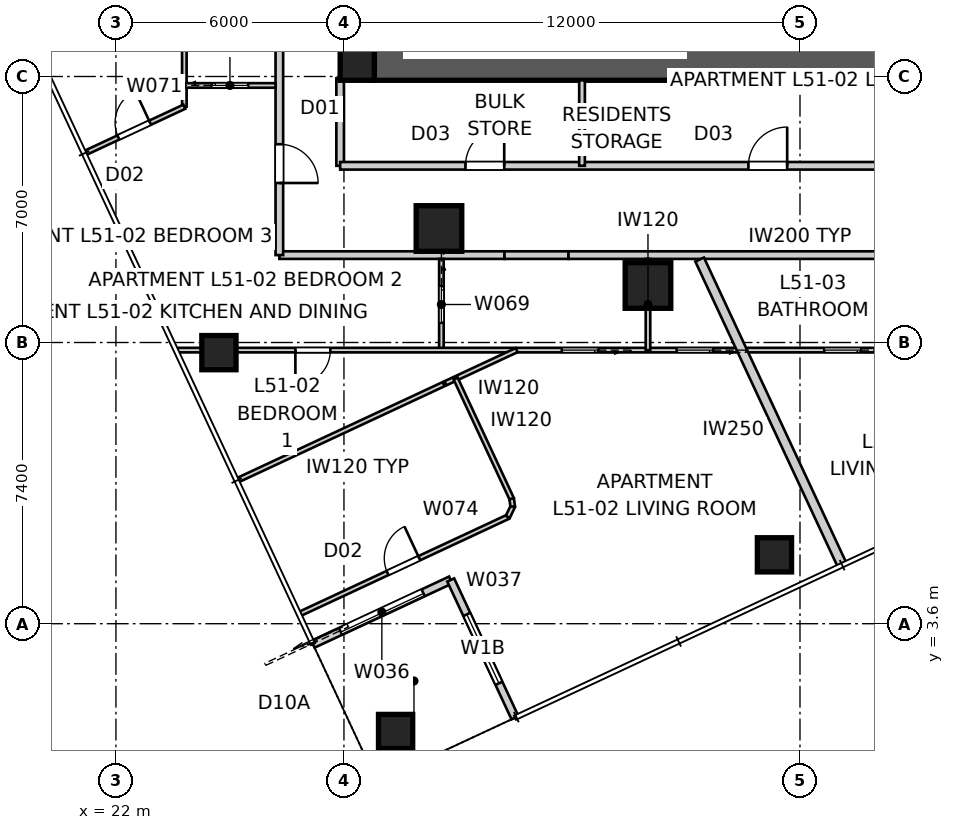
"""IFC4 building model, lengths in metres.
Left out: names, types, materials, properties, quantities, classifications, styles, units other than length and angle.
Written with IfcOpenShell. Run it as: python <this file> out.ifc"""

import sys

from ifc_helpers import new_model, si_unit, direction, frame, frame_2d, origin, origin_2d, place, context, subcontext, project, spatial, polyline, rectangle, outline, extrude, element, fill, save


model = new_model("IFC4")
c1 = context("Model", 3, precision=1e-05, world=origin(), true_north=direction((0.0, 1.0)))
c2 = subcontext(c1, "Body", "Model", "MODEL_VIEW")
j1 = project(units=[si_unit("LENGTHUNIT", "METRE"), si_unit("PLANEANGLEUNIT", "RADIAN")], contexts=[c1])
p1 = place(None, origin())
s1 = spatial("IfcSite", under=j1, at=p1, CompositionType="ELEMENT")
p2 = place(p1, origin())
s2 = spatial("IfcBuilding", under=s1, at=p2, CompositionType="ELEMENT")
p3 = place(p2, frame((0.0, 0.0, 186.2)))
s3 = spatial("IfcBuildingStorey", under=s2, at=p3, CompositionType="ELEMENT", Elevation=186.2)
p4 = place(p3, frame((51.2, 18.35, 0.0), z_axis=(0.0, 0.0, 1.0), x_axis=(-1.0, 0.0, 0.0)))
e1 = element("IfcWall", 1, at=p4, inside=s3, PredefinedType="SHEAR", context=c2, shape_type="SweptSolid", body=[
    extrude(outline(polyline([(0.0, -0.45), (22.4, -0.45), (22.4, -0.025), (22.85, -0.025), (22.85, 0.025), (22.4, 0.025), (22.4, 0.45), (0.0, 0.45), (0.0, 0.025), (-0.45, 0.025), (-0.45, -0.025), (0.0, -0.025), (0.0, -0.45)])), origin(), (0.0, 0.0, 1.0), 3.4),
])
p5 = place(p3, frame((28.35, 41.2, 0.0), z_axis=(0.0, 0.0, 1.0), x_axis=(0.0, -1.0, 0.0)))
e2 = element("IfcWall", 2, at=p5, inside=s3, PredefinedType="SHEAR", context=c2, shape_type="SweptSolid", body=[
    extrude(outline(polyline([(0.0, -0.45), (22.4, -0.45), (22.4, -0.025), (22.85, -0.025), (22.85, 0.025), (22.4, 0.025), (22.4, 0.45), (0.0, 0.45), (0.0, 0.025), (-0.45, 0.025), (-0.45, -0.025), (0.0, -0.025), (0.0, -0.45)])), origin(), (0.0, 0.0, 1.0), 3.4),
])
p6 = place(p5, frame((11.14, 0.0, 0.0)))
e3 = element("IfcOpeningElement", 3, at=p6, cuts=e2, PredefinedType="OPENING", context=c2, shape_type="SweptSolid", body=[
    extrude(rectangle(XDim=1.02, YDim=2.4, at=frame_2d((0.51, 1.2))), frame((0.0, 0.46, 0.0), z_axis=(0.0, -1.0, 0.0), x_axis=(1.0, 0.0, 0.0)), (0.0, 0.0, 1.0), 0.92),
])
for number, where, z_axis, x_axis in (
    (4, (28.35, 18.35, 0.0), (0.0, 0.0, 1.0), (1.0, 0.0, 0.0)),
    (5, (29.359, 0.764, 0.0), (0.0, 0.0, 1.0), (1.0, 0.0, 0.0)),
    (6, (39.328, 5.412, 0.0), (0.0, 0.0, 1.0), (1.0, 0.0, 0.0)),
    (7, (24.71, 10.733, 0.0), (0.0, 0.0, 1.0), (1.0, 0.0, 0.0)),
):
    element("IfcColumn", number, at=place(p3, frame(where, z_axis=z_axis, x_axis=x_axis)), inside=s3, PredefinedType="COLUMN", context=c2, shape_type="SweptSolid", body=[
        extrude(rectangle(XDim=0.9, YDim=0.9, at=origin_2d()), origin(), (0.0, 0.0, 1.0), 3.4),
    ])
for number, where, z_axis, x_axis in (
    (8, (30.5, 14.0, 0.0), (0.0, 0.0, 1.0), (1.0, 0.0, 0.0)),
    (9, (36.0, 12.5, 0.0), (0.0, 0.0, 1.0), (1.0, 0.0, 0.0)),
):
    element("IfcColumn", number, at=place(p3, frame(where, z_axis=z_axis, x_axis=x_axis)), inside=s3, PredefinedType="COLUMN", context=c2, shape_type="SweptSolid", body=[
        extrude(rectangle(XDim=1.2, YDim=1.2, at=origin_2d()), origin(), (0.0, 0.0, 1.0), 3.4),
    ])
p7 = place(p3, frame((27.185, 3.06, 0.0), z_axis=(0.0, 0.0, 1.0), x_axis=(0.906289140828, 0.422658246362, 0.0)))
e10 = element("IfcWall", 10, at=p7, inside=s3, PredefinedType="SOLIDWALL", context=c2, shape_type="SweptSolid", body=[
    extrude(rectangle(XDim=4.0, YDim=0.2, at=frame_2d((2.0, 0.0))), origin(), (0.0, 0.0, 1.0), 3.25),
])
p8 = place(p7, frame((0.8, 0.0, 0.0)))
e11 = element("IfcOpeningElement", 11, at=p8, cuts=e10, PredefinedType="OPENING", context=c2, shape_type="SweptSolid", body=[
    extrude(rectangle(XDim=2.4, YDim=2.1, at=frame_2d((1.2, 1.05))), frame((0.0, 0.11, 0.0), z_axis=(0.0, -1.0, 0.0), x_axis=(1.0, 0.0, 0.0)), (0.0, 0.0, 1.0), 0.22),
])
p9 = place(p3, frame((30.81, 4.75, 0.0), z_axis=(0.0, 0.0, 1.0), x_axis=(0.422658246362, -0.906289140828, 0.0)))
e12 = element("IfcWall", 12, at=p9, inside=s3, PredefinedType="SOLIDWALL", context=c2, shape_type="SweptSolid", body=[
    extrude(rectangle(XDim=4.0, YDim=0.2, at=frame_2d((2.0, 0.0))), origin(), (0.0, 0.0, 1.0), 3.25),
])
p10 = place(p9, frame((1.0, 0.0, 0.45)))
e13 = element("IfcOpeningElement", 13, at=p10, cuts=e12, PredefinedType="OPENING", context=c2, shape_type="SweptSolid", body=[
    extrude(rectangle(XDim=2.0, YDim=1.8, at=frame_2d((1.0, 0.9))), frame((0.0, 0.11, 0.0), z_axis=(0.0, -1.0, 0.0), x_axis=(1.0, 0.0, 0.0)), (0.0, 0.0, 1.0), 0.22),
])
p11 = place(p3, frame((26.3, 13.3, 0.0), z_axis=(0.0, 0.0, 1.0), x_axis=(1.0, 0.0, 0.0)))
e14 = element("IfcWall", 14, at=p11, inside=s3, PredefinedType="PARTITIONING", context=c2, shape_type="SweptSolid", body=[
    extrude(rectangle(XDim=5.925, YDim=0.2, at=frame_2d((2.962, 0.0))), origin(), (0.0, 0.0, 1.0), 3.25),
])
p12 = place(p3, frame((32.225, 13.3, 0.0), z_axis=(0.0, 0.0, 1.0), x_axis=(1.0, 0.0, 0.0)))
e15 = element("IfcWall", 15, at=p12, inside=s3, PredefinedType="PARTITIONING", context=c2, shape_type="SweptSolid", body=[
    extrude(rectangle(XDim=1.684, YDim=0.2, at=frame_2d((0.842, 0.0))), origin(), (0.0, 0.0, 1.0), 2.55),
])
p13 = place(p3, frame((33.908, 13.3, 0.0), z_axis=(0.0, 0.0, 1.0), x_axis=(1.0, 0.0, 0.0)))
e16 = element("IfcWall", 16, at=p13, inside=s3, PredefinedType="PARTITIONING", context=c2, shape_type="SweptSolid", body=[
    extrude(rectangle(XDim=12.183, YDim=0.2, at=frame_2d((6.092, 0.0))), origin(), (0.0, 0.0, 1.0), 3.25),
])
p14 = place(p3, frame((26.3, 47.1, 0.0), z_axis=(0.0, 0.0, 1.0), x_axis=(0.0, -1.0, 0.0)))
e17 = element("IfcWall", 17, at=p14, inside=s3, PredefinedType="PARTITIONING", context=c2, shape_type="SweptSolid", body=[
    extrude(rectangle(XDim=33.8, YDim=0.2, at=frame_2d((16.9, 0.0))), origin(), (0.0, 0.0, 1.0), 3.25),
])
p15 = place(p14, frame((15.449, 0.0, 0.0)))
e18 = element("IfcOpeningElement", 18, at=p15, cuts=e17, PredefinedType="OPENING", context=c2, shape_type="SweptSolid", body=[
    extrude(rectangle(XDim=1.02, YDim=2.34, at=frame_2d((0.51, 1.17))), frame((0.0, 0.11, 0.0), z_axis=(0.0, -1.0, 0.0), x_axis=(1.0, 0.0, 0.0)), (0.0, 0.0, 1.0), 0.22),
])
p16 = place(p14, frame((30.883, 0.0, 0.0)))
e19 = element("IfcOpeningElement", 19, at=p16, cuts=e17, PredefinedType="OPENING", context=c2, shape_type="SweptSolid", body=[
    extrude(rectangle(XDim=1.02, YDim=2.34, at=frame_2d((0.51, 1.17))), frame((0.0, 0.11, 0.0), z_axis=(0.0, -1.0, 0.0), x_axis=(1.0, 0.0, 0.0)), (0.0, 0.0, 1.0), 0.22),
])
p17 = place(p3, frame((41.11, 5.14, 0.0), z_axis=(0.0, 0.0, 1.0), x_axis=(-0.42262942879, 0.906302579672, 0.0)))
e20 = element("IfcWall", 20, at=p17, inside=s3, PredefinedType="PARTITIONING", context=c2, shape_type="SweptSolid", body=[
    extrude(rectangle(XDim=8.875, YDim=0.25, at=frame_2d((4.438, 0.0))), origin(), (0.0, 0.0, 1.0), 3.25),
])
p18 = place(p3, frame((27.9, 17.95, 0.0), z_axis=(0.0, 0.0, 1.0), x_axis=(0.0, -1.0, 0.0)))
e21 = element("IfcWall", 21, at=p18, inside=s3, PredefinedType="PARTITIONING", context=c2, shape_type="SweptSolid", body=[
    extrude(rectangle(XDim=2.3, YDim=0.2, at=frame_2d((1.15, 0.0))), origin(), (0.0, 0.0, 1.0), 3.25),
])
p19 = place(p3, frame((27.9, 15.65, 0.0), z_axis=(0.0, 0.0, 1.0), x_axis=(1.0, 0.0, 0.0)))
e22 = element("IfcWall", 22, at=p19, inside=s3, PredefinedType="PARTITIONING", context=c2, shape_type="SweptSolid", body=[
    extrude(rectangle(XDim=24.2, YDim=0.2, at=frame_2d((12.1, 0.0))), origin(), (0.0, 0.0, 1.0), 3.25),
])
p20 = place(p19, frame((10.743, 0.0, 0.0)))
e23 = element("IfcOpeningElement", 23, at=p20, cuts=e22, PredefinedType="OPENING", context=c2, shape_type="SweptSolid", body=[
    extrude(rectangle(XDim=1.02, YDim=2.1, at=frame_2d((0.51, 1.05))), frame((0.0, 0.11, 0.0), z_axis=(0.0, -1.0, 0.0), x_axis=(1.0, 0.0, 0.0)), (0.0, 0.0, 1.0), 0.22),
])
p21 = place(p19, frame((19.636, 0.0, 0.0)))
e24 = element("IfcOpeningElement", 24, at=p21, cuts=e22, PredefinedType="OPENING", context=c2, shape_type="SweptSolid", body=[
    extrude(rectangle(XDim=1.02, YDim=2.1, at=frame_2d((0.51, 1.05))), frame((0.0, 0.11, 0.0), z_axis=(0.0, -1.0, 0.0), x_axis=(1.0, 0.0, 0.0)), (0.0, 0.0, 1.0), 0.22),
])
p22 = place(p19, frame((3.297, 0.0, 0.0)))
e25 = element("IfcOpeningElement", 25, at=p22, cuts=e22, PredefinedType="OPENING", context=c2, shape_type="SweptSolid", body=[
    extrude(rectangle(XDim=1.02, YDim=2.1, at=frame_2d((0.51, 1.05))), frame((0.0, 0.11, 0.0), z_axis=(0.0, -1.0, 0.0), x_axis=(1.0, 0.0, 0.0)), (0.0, 0.0, 1.0), 0.22),
])
p23 = place(p3, frame((34.265, 15.65, 0.0), z_axis=(0.0, 0.0, 1.0), x_axis=(0.0, 1.0, 0.0)))
e26 = element("IfcWall", 26, at=p23, inside=s3, PredefinedType="SOLIDWALL", context=c2, shape_type="SweptSolid", body=[
    extrude(rectangle(XDim=2.25, YDim=0.15, at=frame_2d((1.125, 0.0))), origin(), (0.0, 0.0, 1.0), 2.796),
])
p24 = place(p3, frame((23.8, 17.205, 0.0), z_axis=(0.0, 0.0, 1.0), x_axis=(0.0, 1.0, 0.0)))
e27 = element("IfcWall", 27, at=p24, inside=s3, PredefinedType="PARTITIONING", context=c2, shape_type="SweptSolid", body=[
    extrude(rectangle(XDim=30.574, YDim=0.12, at=frame_2d((15.287, 0.0))), origin(), (0.0, 0.0, 1.0), 2.55),
])
p25 = place(p24, frame((12.857, 0.0, 0.0)))
e28 = element("IfcOpeningElement", 28, at=p25, cuts=e27, PredefinedType="OPENING", context=c2, shape_type="SweptSolid", body=[
    extrude(rectangle(XDim=0.92, YDim=2.34, at=frame_2d((0.46, 1.17))), frame((0.0, 0.07, 0.0), z_axis=(0.0, -1.0, 0.0), x_axis=(1.0, 0.0, 0.0)), (0.0, 0.0, 1.0), 0.14),
])
p26 = place(p24, frame((28.042, 0.0, 0.0)))
e29 = element("IfcOpeningElement", 29, at=p26, cuts=e27, PredefinedType="OPENING", context=c2, shape_type="SweptSolid", body=[
    extrude(rectangle(XDim=0.92, YDim=2.34, at=frame_2d((0.46, 1.17))), frame((0.0, 0.07, 0.0), z_axis=(0.0, -1.0, 0.0), x_axis=(1.0, 0.0, 0.0)), (0.0, 0.0, 1.0), 0.14),
])
p27 = place(p24, frame((20.655, 0.0, 0.0)))
e30 = element("IfcOpeningElement", 30, at=p27, cuts=e27, PredefinedType="OPENING", context=c2, shape_type="SweptSolid", body=[
    extrude(rectangle(XDim=0.96, YDim=2.1, at=frame_2d((0.48, 1.05))), frame((0.0, 0.07, 0.0), z_axis=(0.0, -1.0, 0.0), x_axis=(1.0, 0.0, 0.0)), (0.0, 0.0, 1.0), 0.14),
])
p28 = place(p3, frame((23.8, 17.765, 0.0), z_axis=(0.0, 0.0, 1.0), x_axis=(1.0, 0.0, 0.0)))
e31 = element("IfcWall", 31, at=p28, inside=s3, PredefinedType="PARTITIONING", context=c2, shape_type="SweptSolid", body=[
    extrude(rectangle(XDim=2.4, YDim=0.12, at=frame_2d((1.2, 0.0))), origin(), (0.0, 0.0, 1.0), 3.25),
])
p29 = place(p28, frame((0.72, 0.0, 0.0)))
e32 = element("IfcOpeningElement", 32, at=p29, cuts=e31, PredefinedType="OPENING", context=c2, shape_type="SweptSolid", body=[
    extrude(rectangle(XDim=0.96, YDim=2.1, at=frame_2d((0.48, 1.05))), frame((0.0, 0.07, 0.0), z_axis=(0.0, -1.0, 0.0), x_axis=(1.0, 0.0, 0.0)), (0.0, 0.0, 1.0), 0.14),
])
p30 = place(p3, frame((30.564, 13.2, 0.0), z_axis=(0.0, 0.0, 1.0), x_axis=(0.0, -1.0, 0.0)))
e33 = element("IfcWall", 33, at=p30, inside=s3, PredefinedType="PARTITIONING", context=c2, shape_type="SweptSolid", body=[
    extrude(rectangle(XDim=2.4, YDim=0.12, at=frame_2d((1.2, 0.0))), origin(), (0.0, 0.0, 1.0), 3.25),
])
p31 = place(p30, frame((0.72, 0.0, 0.0)))
e34 = element("IfcOpeningElement", 34, at=p31, cuts=e33, PredefinedType="OPENING", context=c2, shape_type="SweptSolid", body=[
    extrude(rectangle(XDim=0.96, YDim=2.1, at=frame_2d((0.48, 1.05))), frame((0.0, 0.07, 0.0), z_axis=(0.0, -1.0, 0.0), x_axis=(1.0, 0.0, 0.0)), (0.0, 0.0, 1.0), 0.14),
])
p32 = place(p3, frame((53.208, 10.8, 0.0), z_axis=(0.0, 0.0, 1.0), x_axis=(-1.0, 0.0, 0.0)))
e35 = element("IfcWall", 35, at=p32, inside=s3, PredefinedType="PARTITIONING", context=c2, shape_type="SweptSolid", body=[
    extrude(rectangle(XDim=29.593, YDim=0.12, at=frame_2d((14.796, 0.0))), origin(), (0.0, 0.0, 1.0), 3.25),
])
p33 = place(p32, frame((6.074, 0.0, 0.0)))
e36 = element("IfcOpeningElement", 36, at=p33, cuts=e35, PredefinedType="OPENING", context=c2, shape_type="SweptSolid", body=[
    extrude(rectangle(XDim=0.92, YDim=2.34, at=frame_2d((0.46, 1.17))), frame((0.0, 0.07, 0.0), z_axis=(0.0, -1.0, 0.0), x_axis=(1.0, 0.0, 0.0)), (0.0, 0.0, 1.0), 0.14),
])
p34 = place(p32, frame((25.566, 0.0, 0.0)))
e37 = element("IfcOpeningElement", 37, at=p34, cuts=e35, PredefinedType="OPENING", context=c2, shape_type="SweptSolid", body=[
    extrude(rectangle(XDim=0.92, YDim=2.34, at=frame_2d((0.46, 1.17))), frame((0.0, 0.07, 0.0), z_axis=(0.0, -1.0, 0.0), x_axis=(1.0, 0.0, 0.0)), (0.0, 0.0, 1.0), 0.14),
])
p35 = place(p32, frame((18.515, 0.0, 0.0)))
e38 = element("IfcOpeningElement", 38, at=p35, cuts=e35, PredefinedType="OPENING", context=c2, shape_type="SweptSolid", body=[
    extrude(rectangle(XDim=0.96, YDim=2.1, at=frame_2d((0.48, 1.05))), frame((0.0, 0.07, 0.0), z_axis=(0.0, -1.0, 0.0), x_axis=(1.0, 0.0, 0.0)), (0.0, 0.0, 1.0), 0.14),
])
p36 = place(p32, frame((15.493, 0.0, 0.0)))
e39 = element("IfcOpeningElement", 39, at=p36, cuts=e35, PredefinedType="OPENING", context=c2, shape_type="SweptSolid", body=[
    extrude(rectangle(XDim=0.96, YDim=2.1, at=frame_2d((0.48, 1.05))), frame((0.0, 0.07, 0.0), z_axis=(0.0, -1.0, 0.0), x_axis=(1.0, 0.0, 0.0)), (0.0, 0.0, 1.0), 0.14),
])
p37 = place(p32, frame((11.609, 0.0, 0.0)))
e40 = element("IfcOpeningElement", 40, at=p37, cuts=e35, PredefinedType="OPENING", context=c2, shape_type="SweptSolid", body=[
    extrude(rectangle(XDim=0.96, YDim=2.1, at=frame_2d((0.48, 1.05))), frame((0.0, 0.07, 0.0), z_axis=(0.0, -1.0, 0.0), x_axis=(1.0, 0.0, 0.0)), (0.0, 0.0, 1.0), 0.14),
])
p38 = place(p3, frame((21.199, 15.992, 0.0), z_axis=(0.0, 0.0, 1.0), x_axis=(0.906291760669, 0.422652628697, 0.0)))
e41 = element("IfcWall", 41, at=p38, inside=s3, PredefinedType="PARTITIONING", context=c2, shape_type="SweptSolid", body=[
    extrude(rectangle(XDim=2.87, YDim=0.12, at=frame_2d((1.435, 0.0))), origin(), (0.0, 0.0, 1.0), 3.25),
])
p39 = place(p38, frame((0.955, 0.0, 0.0)))
e42 = element("IfcOpeningElement", 42, at=p39, cuts=e41, PredefinedType="OPENING", context=c2, shape_type="SweptSolid", body=[
    extrude(rectangle(XDim=0.92, YDim=2.34, at=frame_2d((0.46, 1.17))), frame((0.0, 0.07, 0.0), z_axis=(0.0, -1.0, 0.0), x_axis=(1.0, 0.0, 0.0)), (0.0, 0.0, 1.0), 0.14),
])
p40 = place(p3, frame((36.0, 13.2, 0.0), z_axis=(0.0, 0.0, 1.0), x_axis=(0.0, -1.0, 0.0)))
e43 = element("IfcWall", 43, at=p40, inside=s3, PredefinedType="PARTITIONING", context=c2, shape_type="SweptSolid", body=[
    extrude(rectangle(XDim=2.4, YDim=0.12, at=frame_2d((1.2, 0.0))), origin(), (0.0, 0.0, 1.0), 3.25),
])
p41 = place(p3, frame((30.671, 9.927, 0.0), z_axis=(0.0, 0.0, 1.0), x_axis=(0.906306821634, 0.422620332048, 0.0)))
e44 = element("IfcWall", 44, at=p41, inside=s3, PredefinedType="PARTITIONING", context=c2, shape_type="SweptSolid", body=[
    extrude(rectangle(XDim=2.067, YDim=0.12, at=frame_2d((1.033, 0.0))), origin(), (0.0, 0.0, 1.0), 3.25),
])
p42 = place(p3, frame((26.854, 3.865, 0.0), z_axis=(0.0, 0.0, 1.0), x_axis=(0.906251488513, 0.422738973325, 0.0)))
e45 = element("IfcWall", 45, at=p42, inside=s3, PredefinedType="PARTITIONING", context=c2, shape_type="SweptSolid", body=[
    extrude(rectangle(XDim=6.022, YDim=0.12, at=frame_2d((3.011, 0.0))), origin(), (0.0, 0.0, 1.0), 3.25),
])
p43 = place(p42, frame((2.531, 0.0, 0.0)))
e46 = element("IfcOpeningElement", 46, at=p43, cuts=e45, PredefinedType="OPENING", context=c2, shape_type="SweptSolid", body=[
    extrude(rectangle(XDim=0.92, YDim=2.34, at=frame_2d((0.46, 1.17))), frame((0.0, 0.07, 0.0), z_axis=(0.0, -1.0, 0.0), x_axis=(1.0, 0.0, 0.0)), (0.0, 0.0, 1.0), 0.14),
])
p44 = place(p3, frame((32.311, 6.41, 0.0), z_axis=(0.0, 0.0, 1.0), x_axis=(0.432992694072, 0.901397430039, 0.0)))
e47 = element("IfcWall", 47, at=p44, inside=s3, PredefinedType="PARTITIONING", context=c2, shape_type="SweptSolid", body=[
    extrude(rectangle(XDim=0.303, YDim=0.12, at=frame_2d((0.152, 0.0))), origin(), (0.0, 0.0, 1.0), 3.25),
])
p45 = place(p3, frame((32.442, 6.684, 0.0), z_axis=(0.0, 0.0, 1.0), x_axis=(-0.1412579154, 0.989972828585, 0.0)))
e48 = element("IfcWall", 48, at=p45, inside=s3, PredefinedType="PARTITIONING", context=c2, shape_type="SweptSolid", body=[
    extrude(rectangle(XDim=0.209, YDim=0.12, at=frame_2d((0.104, 0.0))), origin(), (0.0, 0.0, 1.0), 3.25),
])
p46 = place(p3, frame((32.413, 6.891, 0.0), z_axis=(0.0, 0.0, 1.0), x_axis=(-0.422628673033, 0.906302932099, 0.0)))
e49 = element("IfcWall", 49, at=p46, inside=s3, PredefinedType="PARTITIONING", context=c2, shape_type="SweptSolid", body=[
    extrude(rectangle(XDim=3.487, YDim=0.12, at=frame_2d((1.744, 0.0))), origin(), (0.0, 0.0, 1.0), 3.25),
])
p47 = place(p3, frame((30.622, 9.904, 0.0), z_axis=(0.0, 0.0, 1.0), x_axis=(-0.906317929608, -0.422596510244, 0.0)))
e50 = element("IfcWall", 50, at=p47, inside=s3, PredefinedType="PARTITIONING", context=c2, shape_type="SweptSolid", body=[
    extrude(rectangle(XDim=5.967, YDim=0.12, at=frame_2d((2.984, 0.0))), origin(), (0.0, 0.0, 1.0), 3.25),
])
p48 = place(p8, origin())
e51 = element("IfcDoor", 51, at=p48, inside=s3, OperationType="SLIDING_TO_LEFT", PredefinedType="DOOR", context=c2, shape_type="SweptSolid", body=[
    extrude(rectangle(XDim=2.4, YDim=2.1, at=frame_2d((1.2, 1.05))), frame((0.0, 0.025, 0.0), z_axis=(0.0, -1.0, 0.0), x_axis=(1.0, 0.0, 0.0)), (0.0, 0.0, 1.0), 0.05),
])
fill(e11, e51)
p49 = place(p10, origin())
e52 = element("IfcWindow", 52, at=p49, inside=s3, PartitioningType="SINGLE_PANEL", PredefinedType="WINDOW", context=c2, shape_type="SweptSolid", body=[
    extrude(rectangle(XDim=2.0, YDim=1.8, at=frame_2d((1.0, 0.9))), frame((0.0, 0.03, 0.0), z_axis=(0.0, -1.0, 0.0), x_axis=(1.0, 0.0, 0.0)), (0.0, 0.0, 1.0), 0.06),
])
fill(e13, e52)
p50 = place(p20, origin())
e53 = element("IfcDoor", 53, at=p50, inside=s3, OperationType="SINGLE_SWING_RIGHT", PredefinedType="DOOR", context=c2, shape_type="SweptSolid", body=[
    extrude(rectangle(XDim=1.02, YDim=2.1, at=frame_2d((0.51, 1.05))), frame((0.0, 0.025, 0.0), z_axis=(0.0, -1.0, 0.0), x_axis=(1.0, 0.0, 0.0)), (0.0, 0.0, 1.0), 0.05),
])
fill(e23, e53)
p51 = place(p22, origin())
e54 = element("IfcDoor", 54, at=p51, inside=s3, OperationType="SINGLE_SWING_RIGHT", PredefinedType="DOOR", context=c2, shape_type="SweptSolid", body=[
    extrude(rectangle(XDim=1.02, YDim=2.1, at=frame_2d((0.51, 1.05))), frame((0.0, 0.025, 0.0), z_axis=(0.0, -1.0, 0.0), x_axis=(1.0, 0.0, 0.0)), (0.0, 0.0, 1.0), 0.05),
])
fill(e25, e54)
p52 = place(p16, origin())
e55 = element("IfcDoor", 55, at=p52, inside=s3, OperationType="SINGLE_SWING_RIGHT", PredefinedType="DOOR", context=c2, shape_type="SweptSolid", body=[
    extrude(rectangle(XDim=1.02, YDim=2.34, at=frame_2d((0.51, 1.17))), frame((0.0, 0.025, 0.0), z_axis=(0.0, -1.0, 0.0), x_axis=(1.0, 0.0, 0.0)), (0.0, 0.0, 1.0), 0.05),
])
fill(e19, e55)
p53 = place(p34, origin())
e56 = element("IfcDoor", 56, at=p53, inside=s3, OperationType="SINGLE_SWING_RIGHT", PredefinedType="DOOR", context=c2, shape_type="SweptSolid", body=[
    extrude(rectangle(XDim=0.92, YDim=2.34, at=frame_2d((0.46, 1.17))), frame((0.0, 0.025, 0.0), z_axis=(0.0, -1.0, 0.0), x_axis=(1.0, 0.0, 0.0)), (0.0, 0.0, 1.0), 0.05),
])
fill(e37, e56)
p54 = place(p39, origin())
e57 = element("IfcDoor", 57, at=p54, inside=s3, OperationType="SINGLE_SWING_RIGHT", PredefinedType="DOOR", context=c2, shape_type="SweptSolid", body=[
    extrude(rectangle(XDim=0.92, YDim=2.34, at=frame_2d((0.46, 1.17))), frame((0.0, 0.025, 0.0), z_axis=(0.0, -1.0, 0.0), x_axis=(1.0, 0.0, 0.0)), (0.0, 0.0, 1.0), 0.05),
])
fill(e42, e57)
p55 = place(p29, origin())
e58 = element("IfcDoor", 58, at=p55, inside=s3, OperationType="SLIDING_TO_LEFT", PredefinedType="DOOR", context=c2, shape_type="SweptSolid", body=[
    extrude(rectangle(XDim=0.96, YDim=2.1, at=frame_2d((0.48, 1.05))), frame((0.0, 0.025, 0.0), z_axis=(0.0, -1.0, 0.0), x_axis=(1.0, 0.0, 0.0)), (0.0, 0.0, 1.0), 0.05),
])
fill(e32, e58)
p56 = place(p31, origin())
e59 = element("IfcDoor", 59, at=p56, inside=s3, OperationType="SLIDING_TO_LEFT", PredefinedType="DOOR", context=c2, shape_type="SweptSolid", body=[
    extrude(rectangle(XDim=0.96, YDim=2.1, at=frame_2d((0.48, 1.05))), frame((0.0, 0.025, 0.0), z_axis=(0.0, -1.0, 0.0), x_axis=(1.0, 0.0, 0.0)), (0.0, 0.0, 1.0), 0.05),
])
fill(e34, e59)
p57 = place(p35, origin())
e60 = element("IfcDoor", 60, at=p57, inside=s3, OperationType="SLIDING_TO_LEFT", PredefinedType="DOOR", context=c2, shape_type="SweptSolid", body=[
    extrude(rectangle(XDim=0.96, YDim=2.1, at=frame_2d((0.48, 1.05))), frame((0.0, 0.025, 0.0), z_axis=(0.0, -1.0, 0.0), x_axis=(1.0, 0.0, 0.0)), (0.0, 0.0, 1.0), 0.05),
])
fill(e38, e60)
p58 = place(p43, origin())
e61 = element("IfcDoor", 61, at=p58, inside=s3, OperationType="SINGLE_SWING_RIGHT", PredefinedType="DOOR", context=c2, shape_type="SweptSolid", body=[
    extrude(rectangle(XDim=0.92, YDim=2.34, at=frame_2d((0.46, 1.17))), frame((0.0, 0.025, 0.0), z_axis=(0.0, -1.0, 0.0), x_axis=(1.0, 0.0, 0.0)), (0.0, 0.0, 1.0), 0.05),
])
fill(e46, e61)
p59 = place(p36, origin())
e62 = element("IfcDoor", 62, at=p59, inside=s3, OperationType="SLIDING_TO_LEFT", PredefinedType="DOOR", context=c2, shape_type="SweptSolid", body=[
    extrude(rectangle(XDim=0.96, YDim=2.1, at=frame_2d((0.48, 1.05))), frame((0.0, 0.025, 0.0), z_axis=(0.0, -1.0, 0.0), x_axis=(1.0, 0.0, 0.0)), (0.0, 0.0, 1.0), 0.05),
])
fill(e39, e62)
p60 = place(p37, origin())
e63 = element("IfcDoor", 63, at=p60, inside=s3, OperationType="SLIDING_TO_LEFT", PredefinedType="DOOR", context=c2, shape_type="SweptSolid", body=[
    extrude(rectangle(XDim=0.96, YDim=2.1, at=frame_2d((0.48, 1.05))), frame((0.0, 0.025, 0.0), z_axis=(0.0, -1.0, 0.0), x_axis=(1.0, 0.0, 0.0)), (0.0, 0.0, 1.0), 0.05),
])
fill(e40, e63)
save(model, sys.argv[1])
